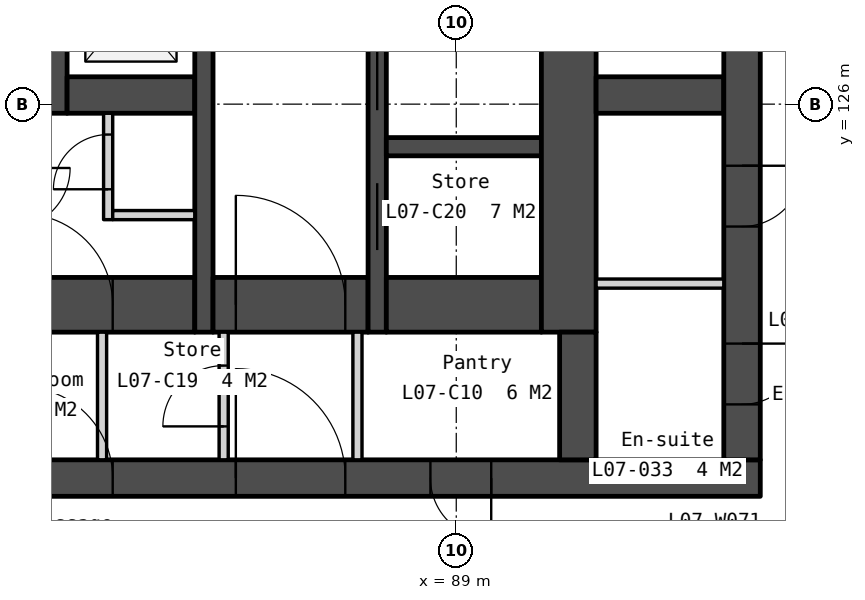
"""IFC4 building model, lengths in metres.
Left out: names, types, materials, properties, quantities, classifications, styles, units other than length and angle.
Written with IfcOpenShell. Run it as: python <this file> out.ifc"""

import sys

from ifc_helpers import new_model, si_unit, direction, frame, frame_2d, origin, place, context, subcontext, project, spatial, polyline, rectangle, outline, extrude, element, fill, save


model = new_model("IFC4")
c1 = context("Model", 3, precision=1e-05, world=origin(), true_north=direction((0.0, 1.0)))
c2 = subcontext(c1, "Body", "Model", "MODEL_VIEW")
j1 = project(units=[si_unit("LENGTHUNIT", "METRE"), si_unit("PLANEANGLEUNIT", "RADIAN")], contexts=[c1])
p1 = place(None, origin())
s1 = spatial("IfcSite", under=j1, at=p1, CompositionType="ELEMENT")
p2 = place(p1, origin())
s2 = spatial("IfcBuilding", under=s1, at=p2, CompositionType="ELEMENT")
p3 = place(p2, frame((0.0, 0.0, 38.5)))
s3 = spatial("IfcBuildingStorey", under=s2, at=p3, CompositionType="ELEMENT", Elevation=38.5)
p4 = place(p3, frame((66.0, 119.85, 0.0), z_axis=(0.0, 0.0, 1.0), x_axis=(1.0, 0.0, 0.0)))
e1 = element("IfcWall", 1, at=p4, inside=s3, PredefinedType="SOLIDWALL", context=c2, shape_type="SweptSolid", body=[
    extrude(rectangle(XDim=28.0, YDim=0.6, at=frame_2d((14.0, 0.0))), origin(), (0.0, 0.0, 1.0), 3.35),
])
p5 = place(p4, frame((6.825, 0.0, 0.0)))
e2 = element("IfcOpeningElement", 2, at=p5, cuts=e1, PredefinedType="OPENING", context=c2, shape_type="SweptSolid", body=[
    extrude(rectangle(XDim=1.8, YDim=2.1, at=frame_2d((0.9, 1.05))), frame((0.0, 0.31, 0.0), z_axis=(0.0, -1.0, 0.0), x_axis=(1.0, 0.0, 0.0)), (0.0, 0.0, 1.0), 0.62),
])
p6 = place(p4, frame((15.85, 0.0, 0.0)))
e3 = element("IfcOpeningElement", 3, at=p6, cuts=e1, PredefinedType="OPENING", context=c2, shape_type="SweptSolid", body=[
    extrude(rectangle(XDim=1.5, YDim=2.1, at=frame_2d((0.75, 1.05))), frame((0.0, 0.31, 0.0), z_axis=(0.0, -1.0, 0.0), x_axis=(1.0, 0.0, 0.0)), (0.0, 0.0, 1.0), 0.62),
])
p7 = place(p4, frame((19.375, 0.0, 0.0)))
e4 = element("IfcOpeningElement", 4, at=p7, cuts=e1, PredefinedType="OPENING", context=c2, shape_type="SweptSolid", body=[
    extrude(rectangle(XDim=1.8, YDim=2.1, at=frame_2d((0.9, 1.05))), frame((0.0, 0.31, 0.0), z_axis=(0.0, -1.0, 0.0), x_axis=(1.0, 0.0, 0.0)), (0.0, 0.0, 1.0), 0.62),
])
p8 = place(p4, frame((4.425, 0.0, 0.0)))
e5 = element("IfcOpeningElement", 5, at=p8, cuts=e1, PredefinedType="OPENING", context=c2, shape_type="SweptSolid", body=[
    extrude(rectangle(XDim=1.0, YDim=2.1, at=frame_2d((0.5, 1.05))), frame((0.0, 0.31, 0.0), z_axis=(0.0, -1.0, 0.0), x_axis=(1.0, 0.0, 0.0)), (0.0, 0.0, 1.0), 0.62),
])
p9 = place(p4, frame((9.783, 0.0, 0.0)))
e6 = element("IfcOpeningElement", 6, at=p9, cuts=e1, PredefinedType="OPENING", context=c2, shape_type="SweptSolid", body=[
    extrude(rectangle(XDim=1.0, YDim=2.1, at=frame_2d((0.5, 1.05))), frame((0.0, 0.31, 0.0), z_axis=(0.0, -1.0, 0.0), x_axis=(1.0, 0.0, 0.0)), (0.0, 0.0, 1.0), 0.62),
])
p10 = place(p4, frame((11.525, 0.0, 0.0)))
e7 = element("IfcOpeningElement", 7, at=p10, cuts=e1, PredefinedType="OPENING", context=c2, shape_type="SweptSolid", body=[
    extrude(rectangle(XDim=1.0, YDim=2.1, at=frame_2d((0.5, 1.05))), frame((0.0, 0.31, 0.0), z_axis=(0.0, -1.0, 0.0), x_axis=(1.0, 0.0, 0.0)), (0.0, 0.0, 1.0), 0.62),
])
p11 = place(p4, frame((13.658, 0.0, 0.0)))
e8 = element("IfcOpeningElement", 8, at=p11, cuts=e1, PredefinedType="OPENING", context=c2, shape_type="SweptSolid", body=[
    extrude(rectangle(XDim=1.0, YDim=2.1, at=frame_2d((0.5, 1.05))), frame((0.0, 0.31, 0.0), z_axis=(0.0, -1.0, 0.0), x_axis=(1.0, 0.0, 0.0)), (0.0, 0.0, 1.0), 0.62),
])
p12 = place(p4, frame((22.575, 0.0, 0.0)))
e9 = element("IfcOpeningElement", 9, at=p12, cuts=e1, PredefinedType="OPENING", context=c2, shape_type="SweptSolid", body=[
    extrude(rectangle(XDim=1.0, YDim=2.1, at=frame_2d((0.5, 1.05))), frame((0.0, 0.31, 0.0), z_axis=(0.0, -1.0, 0.0), x_axis=(1.0, 0.0, 0.0)), (0.0, 0.0, 1.0), 0.62),
])
p13 = place(p3, frame((81.8, 122.7, 0.0), z_axis=(0.0, 0.0, 1.0), x_axis=(1.0, 0.0, 0.0)))
e10 = element("IfcWall", 10, at=p13, inside=s3, PredefinedType="SOLIDWALL", context=c2, shape_type="SweptSolid", body=[
    extrude(rectangle(XDim=2.9, YDim=0.9, at=frame_2d((1.45, 0.0))), origin(), (0.0, 0.0, 1.0), 3.35),
])
p14 = place(p13, frame((0.05, 0.0, 0.0)))
e11 = element("IfcOpeningElement", 11, at=p14, cuts=e10, PredefinedType="OPENING", context=c2, shape_type="SweptSolid", body=[
    extrude(rectangle(XDim=1.5, YDim=2.1, at=frame_2d((0.75, 1.05))), frame((0.0, 0.46, 0.0), z_axis=(0.0, -1.0, 0.0), x_axis=(1.0, 0.0, 0.0)), (0.0, 0.0, 1.0), 0.92),
])
p15 = place(p3, frame((82.45, 133.95, 0.0), z_axis=(0.0, 0.0, 1.0), x_axis=(0.0, -1.0, 0.0)))
e12 = element("IfcWall", 12, at=p15, inside=s3, PredefinedType="SOLIDWALL", context=c2, shape_type="SweptSolid", body=[
    extrude(rectangle(XDim=8.1, YDim=0.3, at=frame_2d((4.05, 0.0))), origin(), (0.0, 0.0, 1.0), 3.35),
])
p16 = place(p15, frame((0.6, 0.0, 0.0)))
e13 = element("IfcOpeningElement", 13, at=p16, cuts=e12, PredefinedType="OPENING", context=c2, shape_type="SweptSolid", body=[
    extrude(rectangle(XDim=1.1, YDim=2.1, at=frame_2d((0.55, 1.05))), frame((0.0, 0.16, 0.0), z_axis=(0.0, -1.0, 0.0), x_axis=(1.0, 0.0, 0.0)), (0.0, 0.0, 1.0), 0.32),
])
p17 = place(p15, frame((3.2, 0.0, 0.0)))
e14 = element("IfcOpeningElement", 14, at=p17, cuts=e12, PredefinedType="OPENING", context=c2, shape_type="SweptSolid", body=[
    extrude(rectangle(XDim=1.1, YDim=2.1, at=frame_2d((0.55, 1.05))), frame((0.0, 0.16, 0.0), z_axis=(0.0, -1.0, 0.0), x_axis=(1.0, 0.0, 0.0)), (0.0, 0.0, 1.0), 0.32),
])
p18 = place(p15, frame((5.8, 0.0, 0.0)))
e15 = element("IfcOpeningElement", 15, at=p18, cuts=e12, PredefinedType="OPENING", context=c2, shape_type="SweptSolid", body=[
    extrude(rectangle(XDim=1.1, YDim=2.1, at=frame_2d((0.55, 1.05))), frame((0.0, 0.16, 0.0), z_axis=(0.0, -1.0, 0.0), x_axis=(1.0, 0.0, 0.0)), (0.0, 0.0, 1.0), 0.32),
])
p19 = place(p3, frame((82.6, 126.15, 0.0), z_axis=(0.0, 0.0, 1.0), x_axis=(1.0, 0.0, 0.0)))
e16 = element("IfcWall", 16, at=p19, inside=s3, PredefinedType="SOLIDWALL", context=c2, shape_type="SweptSolid", body=[
    extrude(rectangle(XDim=2.1, YDim=0.6, at=frame_2d((1.05, 0.0))), origin(), (0.0, 0.0, 1.0), 3.35),
])
p20 = place(p3, frame((83.175, 122.25, 0.0), z_axis=(0.0, 0.0, 1.0), x_axis=(0.0, -1.0, 0.0)))
e17 = element("IfcWall", 17, at=p20, inside=s3, PredefinedType="PARTITIONING", context=c2, shape_type="SweptSolid", body=[
    extrude(rectangle(XDim=2.1, YDim=0.15, at=frame_2d((1.05, 0.0))), origin(), (0.0, 0.0, 1.0), 3.35),
])
p21 = place(p3, frame((83.275, 125.85, 0.0), z_axis=(0.0, 0.0, 1.0), x_axis=(0.0, -1.0, 0.0)))
e18 = element("IfcWall", 18, at=p21, inside=s3, PredefinedType="PARTITIONING", context=c2, shape_type="SweptSolid", body=[
    extrude(rectangle(XDim=1.75, YDim=0.15, at=frame_2d((0.875, 0.0))), origin(), (0.0, 0.0, 1.0), 3.35),
])
p22 = place(p21, frame((0.35, 0.0, 0.0)))
e19 = element("IfcOpeningElement", 19, at=p22, cuts=e18, PredefinedType="OPENING", context=c2, shape_type="SweptSolid", body=[
    extrude(rectangle(XDim=0.9, YDim=2.1, at=frame_2d((0.45, 1.05))), frame((0.0, 0.085, 0.0), z_axis=(0.0, -1.0, 0.0), x_axis=(1.0, 0.0, 0.0)), (0.0, 0.0, 1.0), 0.17),
])
p23 = place(p3, frame((83.35, 124.175, 0.0), z_axis=(0.0, 0.0, 1.0), x_axis=(1.0, 0.0, 0.0)))
e20 = element("IfcWall", 20, at=p23, inside=s3, PredefinedType="PARTITIONING", context=c2, shape_type="SweptSolid", body=[
    extrude(rectangle(XDim=1.35, YDim=0.15, at=frame_2d((0.675, 0.0))), origin(), (0.0, 0.0, 1.0), 3.35),
])
p24 = place(p3, frame((84.85, 133.95, 0.0), z_axis=(0.0, 0.0, 1.0), x_axis=(0.0, -1.0, 0.0)))
e21 = element("IfcWall", 21, at=p24, inside=s3, PredefinedType="SOLIDWALL", context=c2, shape_type="SweptSolid", body=[
    extrude(rectangle(XDim=11.7, YDim=0.3, at=frame_2d((5.85, 0.0))), origin(), (0.0, 0.0, 1.0), 3.35),
])
p25 = place(p3, frame((85.0, 122.7, 0.0), z_axis=(0.0, 0.0, 1.0), x_axis=(1.0, 0.0, 0.0)))
e22 = element("IfcWall", 22, at=p25, inside=s3, PredefinedType="SOLIDWALL", context=c2, shape_type="SweptSolid", body=[
    extrude(rectangle(XDim=2.55, YDim=0.9, at=frame_2d((1.275, 0.0))), origin(), (0.0, 0.0, 1.0), 3.35),
])
p26 = place(p25, frame((0.375, 0.0, 0.0)))
e23 = element("IfcOpeningElement", 23, at=p26, cuts=e22, PredefinedType="OPENING", context=c2, shape_type="SweptSolid", body=[
    extrude(rectangle(XDim=1.8, YDim=2.1, at=frame_2d((0.9, 1.05))), frame((0.0, 0.46, 0.0), z_axis=(0.0, -1.0, 0.0), x_axis=(1.0, 0.0, 0.0)), (0.0, 0.0, 1.0), 0.92),
])
p27 = place(p3, frame((85.175, 122.25, 0.0), z_axis=(0.0, 0.0, 1.0), x_axis=(0.0, -1.0, 0.0)))
e24 = element("IfcWall", 24, at=p27, inside=s3, PredefinedType="PARTITIONING", context=c2, shape_type="SweptSolid", body=[
    extrude(rectangle(XDim=2.1, YDim=0.15, at=frame_2d((1.05, 0.0))), origin(), (0.0, 0.0, 1.0), 3.35),
])
p28 = place(p27, frame((0.55, 0.0, 0.0)))
e25 = element("IfcOpeningElement", 25, at=p28, cuts=e24, PredefinedType="OPENING", context=c2, shape_type="SweptSolid", body=[
    extrude(rectangle(XDim=1.0, YDim=2.1, at=frame_2d((0.5, 1.05))), frame((0.0, 0.085, 0.0), z_axis=(0.0, -1.0, 0.0), x_axis=(1.0, 0.0, 0.0)), (0.0, 0.0, 1.0), 0.17),
])
p29 = place(p3, frame((87.375, 122.25, 0.0), z_axis=(0.0, 0.0, 1.0), x_axis=(0.0, -1.0, 0.0)))
e26 = element("IfcWall", 26, at=p29, inside=s3, PredefinedType="PARTITIONING", context=c2, shape_type="SweptSolid", body=[
    extrude(rectangle(XDim=2.1, YDim=0.15, at=frame_2d((1.05, 0.0))), origin(), (0.0, 0.0, 1.0), 3.35),
])
p30 = place(p3, frame((87.7, 133.95, 0.0), z_axis=(0.0, 0.0, 1.0), x_axis=(0.0, -1.0, 0.0)))
e27 = element("IfcWall", 27, at=p30, inside=s3, PredefinedType="SOLIDWALL", context=c2, shape_type="SweptSolid", body=[
    extrude(rectangle(XDim=11.7, YDim=0.3, at=frame_2d((5.85, 0.0))), origin(), (0.0, 0.0, 1.0), 3.35),
])
p31 = place(p30, frame((6.95, 0.0, 0.0)))
e28 = element("IfcOpeningElement", 28, at=p31, cuts=e27, PredefinedType="OPENING", context=c2, shape_type="SweptSolid", body=[
    extrude(rectangle(XDim=1.1, YDim=2.1, at=frame_2d((0.55, 1.05))), frame((0.0, 0.16, 0.0), z_axis=(0.0, -1.0, 0.0), x_axis=(1.0, 0.0, 0.0)), (0.0, 0.0, 1.0), 0.32),
])
p32 = place(p30, frame((5.1, 0.0, 0.0)))
e29 = element("IfcOpeningElement", 29, at=p32, cuts=e27, PredefinedType="OPENING", context=c2, shape_type="SweptSolid", body=[
    extrude(rectangle(XDim=1.0, YDim=2.1, at=frame_2d((0.5, 1.05))), frame((0.0, 0.16, 0.0), z_axis=(0.0, -1.0, 0.0), x_axis=(1.0, 0.0, 0.0)), (0.0, 0.0, 1.0), 0.32),
])
p33 = place(p30, frame((9.25, 0.0, 0.0)))
e30 = element("IfcOpeningElement", 30, at=p33, cuts=e27, PredefinedType="OPENING", context=c2, shape_type="SweptSolid", body=[
    extrude(rectangle(XDim=1.1, YDim=2.1, at=frame_2d((0.55, 1.05))), frame((0.0, 0.16, 0.0), z_axis=(0.0, -1.0, 0.0), x_axis=(1.0, 0.0, 0.0)), (0.0, 0.0, 1.0), 0.32),
])
p34 = place(p3, frame((87.85, 125.3, 0.0), z_axis=(0.0, 0.0, 1.0), x_axis=(1.0, 0.0, 0.0)))
e31 = element("IfcWall", 31, at=p34, inside=s3, PredefinedType="SOLIDWALL", context=c2, shape_type="SweptSolid", body=[
    extrude(rectangle(XDim=2.55, YDim=0.3, at=frame_2d((1.275, 0.0))), origin(), (0.0, 0.0, 1.0), 3.35),
])
p35 = place(p3, frame((87.85, 122.7, 0.0), z_axis=(0.0, 0.0, 1.0), x_axis=(1.0, 0.0, 0.0)))
e32 = element("IfcWall", 32, at=p35, inside=s3, PredefinedType="SOLIDWALL", context=c2, shape_type="SweptSolid", body=[
    extrude(rectangle(XDim=2.55, YDim=0.9, at=frame_2d((1.275, 0.0))), origin(), (0.0, 0.0, 1.0), 3.35),
])
p36 = place(p3, frame((90.85, 133.95, 0.0), z_axis=(0.0, 0.0, 1.0), x_axis=(0.0, -1.0, 0.0)))
e33 = element("IfcWall", 33, at=p36, inside=s3, PredefinedType="SOLIDWALL", context=c2, shape_type="SweptSolid", body=[
    extrude(rectangle(XDim=11.7, YDim=0.9, at=frame_2d((5.85, 0.0))), origin(), (0.0, 0.0, 1.0), 3.35),
])
p37 = place(p3, frame((91.0, 122.25, 0.0), z_axis=(0.0, 0.0, 1.0), x_axis=(0.0, -1.0, 0.0)))
e34 = element("IfcWall", 34, at=p37, inside=s3, PredefinedType="SOLIDWALL", context=c2, shape_type="SweptSolid", body=[
    extrude(rectangle(XDim=2.1, YDim=0.6, at=frame_2d((1.05, 0.0))), origin(), (0.0, 0.0, 1.0), 3.35),
])
p38 = place(p3, frame((91.3, 126.15, 0.0), z_axis=(0.0, 0.0, 1.0), x_axis=(1.0, 0.0, 0.0)))
e35 = element("IfcWall", 35, at=p38, inside=s3, PredefinedType="SOLIDWALL", context=c2, shape_type="SweptSolid", body=[
    extrude(rectangle(XDim=2.1, YDim=0.6, at=frame_2d((1.05, 0.0))), origin(), (0.0, 0.0, 1.0), 3.35),
])
p39 = place(p3, frame((91.3, 123.049, 0.0), z_axis=(0.0, 0.0, 1.0), x_axis=(1.0, 0.0, 0.0)))
e36 = element("IfcWall", 36, at=p39, inside=s3, PredefinedType="PARTITIONING", context=c2, shape_type="SweptSolid", body=[
    extrude(rectangle(XDim=2.1, YDim=0.15, at=frame_2d((1.05, 0.0))), origin(), (0.0, 0.0, 1.0), 3.35),
])
p40 = place(p3, frame((93.7, 133.95, 0.0), z_axis=(0.0, 0.0, 1.0), x_axis=(0.0, -1.0, 0.0)))
e37 = element("IfcWall", 37, at=p40, inside=s3, PredefinedType="SOLIDWALL", context=c2, shape_type="SweptSolid", body=[
    extrude(rectangle(XDim=13.8, YDim=0.6, at=frame_2d((6.9, 0.0))), origin(), (0.0, 0.0, 1.0), 3.35),
])
p41 = place(p40, frame((0.6, 0.0, 0.0)))
e38 = element("IfcOpeningElement", 38, at=p41, cuts=e37, PredefinedType="OPENING", context=c2, shape_type="SweptSolid", body=[
    extrude(rectangle(XDim=1.1, YDim=2.1, at=frame_2d((0.55, 1.05))), frame((0.0, 0.31, 0.0), z_axis=(0.0, -1.0, 0.0), x_axis=(1.0, 0.0, 0.0)), (0.0, 0.0, 1.0), 0.62),
])
p42 = place(p40, frame((8.963, 0.0, 0.0)))
e39 = element("IfcOpeningElement", 39, at=p42, cuts=e37, PredefinedType="OPENING", context=c2, shape_type="SweptSolid", body=[
    extrude(rectangle(XDim=1.0, YDim=2.1, at=frame_2d((0.5, 1.05))), frame((0.0, 0.31, 0.0), z_axis=(0.0, -1.0, 0.0), x_axis=(1.0, 0.0, 0.0)), (0.0, 0.0, 1.0), 0.62),
])
p43 = place(p40, frame((11.888, 0.0, 0.0)))
e40 = element("IfcOpeningElement", 40, at=p43, cuts=e37, PredefinedType="OPENING", context=c2, shape_type="SweptSolid", body=[
    extrude(rectangle(XDim=1.0, YDim=2.1, at=frame_2d((0.5, 1.05))), frame((0.0, 0.31, 0.0), z_axis=(0.0, -1.0, 0.0), x_axis=(1.0, 0.0, 0.0)), (0.0, 0.0, 1.0), 0.62),
])
p44 = place(p3, frame((83.105, 90.599, -0.15), z_axis=(0.0, 0.0, 1.0), x_axis=(0.499999201451, 0.866025864826, 0.0)))
e41 = element("IfcWall", 41, at=p44, inside=s3, PredefinedType="SOLIDWALL", context=c2, shape_type="SweptSolid", body=[
    extrude(outline(polyline([(44.8, 0.0), (44.8, 3.5), (0.0, 3.5), (0.0, 0.0), (44.8, 0.0)])), frame((0.0, 0.225, 0.0), z_axis=(0.0, -1.0, 0.0), x_axis=(1.0, 0.0, 0.0)), (0.0, 0.0, 1.0), 0.45),
])
p45 = place(p44, frame((0.722, 0.0, 1.05)))
e42 = element("IfcOpeningElement", 42, at=p45, cuts=e41, PredefinedType="OPENING", context=c2, shape_type="SweptSolid", body=[
    extrude(rectangle(XDim=1.2, YDim=1.5, at=frame_2d((0.6, 0.75))), frame((0.0, 0.235, 0.0), z_axis=(0.0, -1.0, 0.0), x_axis=(1.0, 0.0, 0.0)), (0.0, 0.0, 1.0), 0.47),
])
p46 = place(p44, frame((7.51, 0.0, 1.05)))
e43 = element("IfcOpeningElement", 43, at=p46, cuts=e41, PredefinedType="OPENING", context=c2, shape_type="SweptSolid", body=[
    extrude(rectangle(XDim=1.2, YDim=1.5, at=frame_2d((0.6, 0.75))), frame((0.0, 0.235, 0.0), z_axis=(0.0, -1.0, 0.0), x_axis=(1.0, 0.0, 0.0)), (0.0, 0.0, 1.0), 0.47),
])
p47 = place(p44, frame((9.21, 0.0, 1.05)))
e44 = element("IfcOpeningElement", 44, at=p47, cuts=e41, PredefinedType="OPENING", context=c2, shape_type="SweptSolid", body=[
    extrude(rectangle(XDim=1.2, YDim=1.5, at=frame_2d((0.6, 0.75))), frame((0.0, 0.235, 0.0), z_axis=(0.0, -1.0, 0.0), x_axis=(1.0, 0.0, 0.0)), (0.0, 0.0, 1.0), 0.47),
])
p48 = place(p44, frame((16.47, 0.0, 1.05)))
e45 = element("IfcOpeningElement", 45, at=p48, cuts=e41, PredefinedType="OPENING", context=c2, shape_type="SweptSolid", body=[
    extrude(rectangle(XDim=1.2, YDim=1.5, at=frame_2d((0.6, 0.75))), frame((0.0, 0.235, 0.0), z_axis=(0.0, -1.0, 0.0), x_axis=(1.0, 0.0, 0.0)), (0.0, 0.0, 1.0), 0.47),
])
p49 = place(p44, frame((18.17, 0.0, 1.05)))
e46 = element("IfcOpeningElement", 46, at=p49, cuts=e41, PredefinedType="OPENING", context=c2, shape_type="SweptSolid", body=[
    extrude(rectangle(XDim=1.2, YDim=1.5, at=frame_2d((0.6, 0.75))), frame((0.0, 0.235, 0.0), z_axis=(0.0, -1.0, 0.0), x_axis=(1.0, 0.0, 0.0)), (0.0, 0.0, 1.0), 0.47),
])
p50 = place(p44, frame((25.43, 0.0, 1.05)))
e47 = element("IfcOpeningElement", 47, at=p50, cuts=e41, PredefinedType="OPENING", context=c2, shape_type="SweptSolid", body=[
    extrude(rectangle(XDim=1.2, YDim=1.5, at=frame_2d((0.6, 0.75))), frame((0.0, 0.235, 0.0), z_axis=(0.0, -1.0, 0.0), x_axis=(1.0, 0.0, 0.0)), (0.0, 0.0, 1.0), 0.47),
])
p51 = place(p44, frame((27.13, 0.0, 1.05)))
e48 = element("IfcOpeningElement", 48, at=p51, cuts=e41, PredefinedType="OPENING", context=c2, shape_type="SweptSolid", body=[
    extrude(rectangle(XDim=1.2, YDim=1.5, at=frame_2d((0.6, 0.75))), frame((0.0, 0.235, 0.0), z_axis=(0.0, -1.0, 0.0), x_axis=(1.0, 0.0, 0.0)), (0.0, 0.0, 1.0), 0.47),
])
p52 = place(p44, frame((34.39, 0.0, 1.05)))
e49 = element("IfcOpeningElement", 49, at=p52, cuts=e41, PredefinedType="OPENING", context=c2, shape_type="SweptSolid", body=[
    extrude(rectangle(XDim=1.2, YDim=1.5, at=frame_2d((0.6, 0.75))), frame((0.0, 0.235, 0.0), z_axis=(0.0, -1.0, 0.0), x_axis=(1.0, 0.0, 0.0)), (0.0, 0.0, 1.0), 0.47),
])
p53 = place(p44, frame((36.09, 0.0, 1.05)))
e50 = element("IfcOpeningElement", 50, at=p53, cuts=e41, PredefinedType="OPENING", context=c2, shape_type="SweptSolid", body=[
    extrude(rectangle(XDim=1.2, YDim=1.5, at=frame_2d((0.6, 0.75))), frame((0.0, 0.235, 0.0), z_axis=(0.0, -1.0, 0.0), x_axis=(1.0, 0.0, 0.0)), (0.0, 0.0, 1.0), 0.47),
])
p54 = place(p44, frame((42.878, 0.0, 1.05)))
e51 = element("IfcOpeningElement", 51, at=p54, cuts=e41, PredefinedType="OPENING", context=c2, shape_type="SweptSolid", body=[
    extrude(rectangle(XDim=1.2, YDim=1.5, at=frame_2d((0.6, 0.75))), frame((0.0, 0.235, 0.0), z_axis=(0.0, -1.0, 0.0), x_axis=(1.0, 0.0, 0.0)), (0.0, 0.0, 1.0), 0.47),
])
p55 = place(p42, origin())
e52 = element("IfcDoor", 52, at=p55, inside=s3, OperationType="SINGLE_SWING_LEFT", PredefinedType="DOOR", context=c2, shape_type="SweptSolid", body=[
    extrude(rectangle(XDim=1.0, YDim=2.1, at=frame_2d((0.5, 1.05))), frame((0.0, 0.025, 0.0), z_axis=(0.0, -1.0, 0.0), x_axis=(1.0, 0.0, 0.0)), (0.0, 0.0, 1.0), 0.05),
])
fill(e39, e52)
p56 = place(p43, origin())
e53 = element("IfcDoor", 53, at=p56, inside=s3, OperationType="SINGLE_SWING_LEFT", PredefinedType="DOOR", context=c2, shape_type="SweptSolid", body=[
    extrude(rectangle(XDim=1.0, YDim=2.1, at=frame_2d((0.5, 1.05))), frame((0.0, 0.025, 0.0), z_axis=(0.0, -1.0, 0.0), x_axis=(1.0, 0.0, 0.0)), (0.0, 0.0, 1.0), 0.05),
])
fill(e40, e53)
p57 = place(p31, origin())
e54 = element("IfcDoor", 54, at=p57, inside=s3, OperationType="SLIDING_TO_LEFT", PredefinedType="DOOR", context=c2, shape_type="SweptSolid", body=[
    extrude(rectangle(XDim=1.1, YDim=2.1, at=frame_2d((0.55, 1.05))), frame((0.0, 0.025, 0.0), z_axis=(0.0, -1.0, 0.0), x_axis=(1.0, 0.0, 0.0)), (0.0, 0.0, 1.0), 0.05),
])
fill(e28, e54)
p58 = place(p26, origin())
e55 = element("IfcDoor", 55, at=p58, inside=s3, OperationType="DOUBLE_DOOR_DOUBLE_SWING", PredefinedType="DOOR", context=c2, shape_type="SweptSolid", body=[
    extrude(rectangle(XDim=1.8, YDim=2.1, at=frame_2d((0.9, 1.05))), frame((0.0, 0.025, 0.0), z_axis=(0.0, -1.0, 0.0), x_axis=(1.0, 0.0, 0.0)), (0.0, 0.0, 1.0), 0.05),
])
fill(e23, e55)
p59 = place(p14, origin())
e56 = element("IfcDoor", 56, at=p59, inside=s3, OperationType="DOUBLE_DOOR_DOUBLE_SWING", PredefinedType="DOOR", context=c2, shape_type="SweptSolid", body=[
    extrude(rectangle(XDim=1.5, YDim=2.1, at=frame_2d((0.75, 1.05))), frame((0.0, 0.025, 0.0), z_axis=(0.0, -1.0, 0.0), x_axis=(1.0, 0.0, 0.0)), (0.0, 0.0, 1.0), 0.05),
])
fill(e11, e56)
p60 = place(p6, origin())
e57 = element("IfcDoor", 57, at=p60, inside=s3, OperationType="DOUBLE_DOOR_DOUBLE_SWING", PredefinedType="DOOR", context=c2, shape_type="SweptSolid", body=[
    extrude(rectangle(XDim=1.5, YDim=2.1, at=frame_2d((0.75, 1.05))), frame((0.0, 0.025, 0.0), z_axis=(0.0, -1.0, 0.0), x_axis=(1.0, 0.0, 0.0)), (0.0, 0.0, 1.0), 0.05),
])
fill(e3, e57)
p61 = place(p7, origin())
e58 = element("IfcDoor", 58, at=p61, inside=s3, OperationType="DOUBLE_DOOR_DOUBLE_SWING", PredefinedType="DOOR", context=c2, shape_type="SweptSolid", body=[
    extrude(rectangle(XDim=1.8, YDim=2.1, at=frame_2d((0.9, 1.05))), frame((0.0, 0.025, 0.0), z_axis=(0.0, -1.0, 0.0), x_axis=(1.0, 0.0, 0.0)), (0.0, 0.0, 1.0), 0.05),
])
fill(e4, e58)
p62 = place(p22, origin())
e59 = element("IfcDoor", 59, at=p62, inside=s3, OperationType="SINGLE_SWING_RIGHT", PredefinedType="DOOR", context=c2, shape_type="SweptSolid", body=[
    extrude(rectangle(XDim=0.9, YDim=2.1, at=frame_2d((0.45, 1.05))), frame((0.0, 0.025, 0.0), z_axis=(0.0, -1.0, 0.0), x_axis=(1.0, 0.0, 0.0)), (0.0, 0.0, 1.0), 0.05),
])
fill(e19, e59)
p63 = place(p28, origin())
e60 = element("IfcDoor", 60, at=p63, inside=s3, OperationType="SINGLE_SWING_RIGHT", PredefinedType="DOOR", context=c2, shape_type="SweptSolid", body=[
    extrude(rectangle(XDim=1.0, YDim=2.1, at=frame_2d((0.5, 1.05))), frame((0.0, 0.025, 0.0), z_axis=(0.0, -1.0, 0.0), x_axis=(1.0, 0.0, 0.0)), (0.0, 0.0, 1.0), 0.05),
])
fill(e25, e60)
p64 = place(p12, origin())
e61 = element("IfcDoor", 61, at=p64, inside=s3, OperationType="SINGLE_SWING_RIGHT", PredefinedType="DOOR", context=c2, shape_type="SweptSolid", body=[
    extrude(rectangle(XDim=1.0, YDim=2.1, at=frame_2d((0.5, 1.05))), frame((0.0, 0.025, 0.0), z_axis=(0.0, -1.0, 0.0), x_axis=(1.0, 0.0, 0.0)), (0.0, 0.0, 1.0), 0.05),
])
fill(e9, e61)
p65 = place(p33, origin())
e62 = element("IfcDoor", 62, at=p65, inside=s3, OperationType="SLIDING_TO_LEFT", PredefinedType="DOOR", context=c2, shape_type="SweptSolid", body=[
    extrude(rectangle(XDim=1.1, YDim=2.1, at=frame_2d((0.55, 1.05))), frame((0.0, 0.025, 0.0), z_axis=(0.0, -1.0, 0.0), x_axis=(1.0, 0.0, 0.0)), (0.0, 0.0, 1.0), 0.05),
])
fill(e30, e62)
save(model, sys.argv[1])
